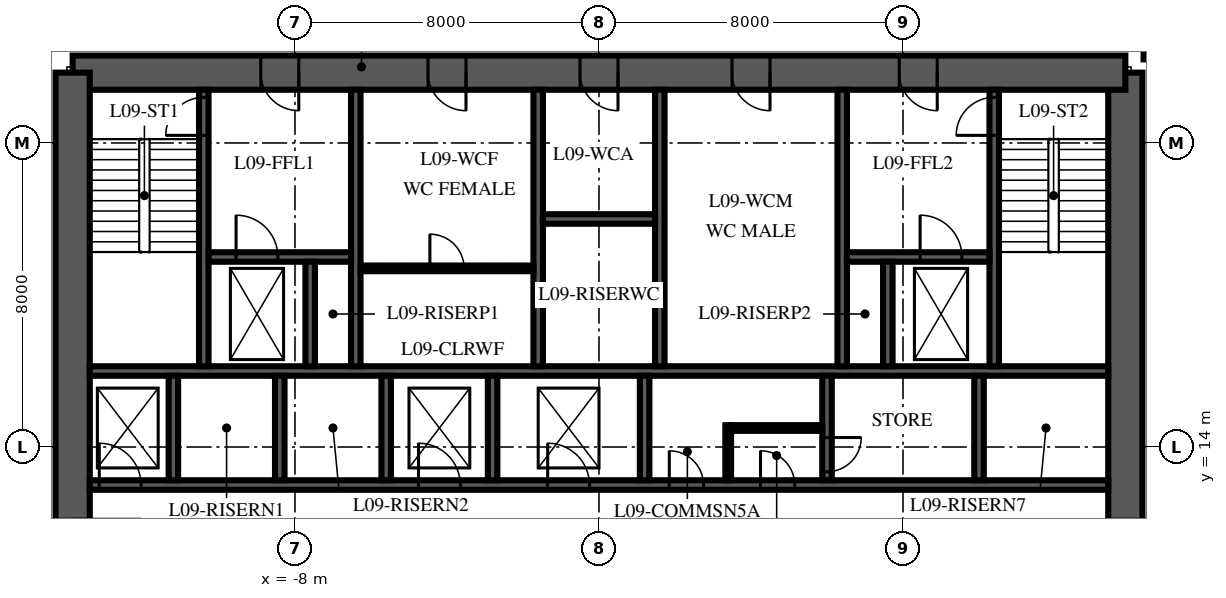
"""IFC4 building model, lengths in metres.
Left out: names, types, materials, properties, quantities, classifications, styles, units other than length and angle.
Written with IfcOpenShell. Run it as: python <this file> out.ifc"""

import sys

from ifc_helpers import new_model, si_unit, direction, frame, frame_2d, origin, place, context, subcontext, project, spatial, polyline, rectangle, outline, extrude, element, fill, save


model = new_model("IFC4")
c1 = context("Model", 3, precision=1e-05, world=origin(), true_north=direction((0.0, 1.0)))
c2 = subcontext(c1, "Body", "Model", "MODEL_VIEW")
j1 = project(units=[si_unit("LENGTHUNIT", "METRE"), si_unit("PLANEANGLEUNIT", "RADIAN")], contexts=[c1])
p1 = place(None, origin())
s1 = spatial("IfcSite", under=j1, at=p1, CompositionType="ELEMENT")
p2 = place(p1, origin())
s2 = spatial("IfcBuilding", under=s1, at=p2, CompositionType="ELEMENT")
p3 = place(p2, frame((0.0, 0.0, 48.0)))
s3 = spatial("IfcBuildingStorey", under=s2, at=p3, CompositionType="ELEMENT", Elevation=48.0)
p4 = place(p3, frame((13.85, 6.15, 0.0), z_axis=(0.0, 0.0, 1.0), x_axis=(0.0, 1.0, 0.0)))
e1 = element("IfcWall", 1, at=p4, inside=s3, PredefinedType="SHEAR", context=c2, shape_type="SweptSolid", body=[
    extrude(outline(polyline([(0.0, -0.45), (17.7, -0.45), (17.7, 0.0), (17.25, 0.0), (17.25, 0.45), (0.45, 0.45), (0.45, 0.0), (0.0, 0.0), (0.0, -0.45)])), origin(), (0.0, 0.0, 1.0), 4.0),
])
p5 = place(p4, frame((4.15, 0.0, 0.0)))
e2 = element("IfcOpeningElement", 2, at=p5, cuts=e1, PredefinedType="OPENING", context=c2, shape_type="SweptSolid", body=[
    extrude(rectangle(XDim=1.8, YDim=2.4, at=frame_2d((0.9, 1.2))), frame((0.0, 0.465, 0.0), z_axis=(0.0, -1.0, 0.0), x_axis=(1.0, 0.0, 0.0)), (0.0, 0.0, 1.0), 0.93),
])
p6 = place(p3, frame((13.85, 23.85, 0.0), z_axis=(0.0, 0.0, 1.0), x_axis=(-1.0, 0.0, 0.0)))
e3 = element("IfcWall", 3, at=p6, inside=s3, PredefinedType="SHEAR", context=c2, shape_type="SweptSolid", body=[
    extrude(rectangle(XDim=27.7, YDim=0.9, at=frame_2d((13.85, 0.0))), origin(), (0.0, 0.0, 1.0), 4.0),
])
p7 = place(p6, frame((21.75, 0.0, 0.0)))
e4 = element("IfcOpeningElement", 4, at=p7, cuts=e3, PredefinedType="OPENING", context=c2, shape_type="SweptSolid", body=[
    extrude(rectangle(XDim=1.0, YDim=2.1, at=frame_2d((0.5, 1.05))), frame((0.0, 0.465, 0.0), z_axis=(0.0, -1.0, 0.0), x_axis=(1.0, 0.0, 0.0)), (0.0, 0.0, 1.0), 0.93),
])
p8 = place(p6, frame((4.95, 0.0, 0.0)))
e5 = element("IfcOpeningElement", 5, at=p8, cuts=e3, PredefinedType="OPENING", context=c2, shape_type="SweptSolid", body=[
    extrude(rectangle(XDim=1.0, YDim=2.1, at=frame_2d((0.5, 1.05))), frame((0.0, 0.465, 0.0), z_axis=(0.0, -1.0, 0.0), x_axis=(1.0, 0.0, 0.0)), (0.0, 0.0, 1.0), 0.93),
])
p9 = place(p6, frame((17.35, 0.0, 0.0)))
e6 = element("IfcOpeningElement", 6, at=p9, cuts=e3, PredefinedType="OPENING", context=c2, shape_type="SweptSolid", body=[
    extrude(rectangle(XDim=1.0, YDim=2.1, at=frame_2d((0.5, 1.05))), frame((0.0, 0.465, 0.0), z_axis=(0.0, -1.0, 0.0), x_axis=(1.0, 0.0, 0.0)), (0.0, 0.0, 1.0), 0.93),
])
p10 = place(p6, frame((13.35, 0.0, 0.0)))
e7 = element("IfcOpeningElement", 7, at=p10, cuts=e3, PredefinedType="OPENING", context=c2, shape_type="SweptSolid", body=[
    extrude(rectangle(XDim=1.0, YDim=2.1, at=frame_2d((0.5, 1.05))), frame((0.0, 0.465, 0.0), z_axis=(0.0, -1.0, 0.0), x_axis=(1.0, 0.0, 0.0)), (0.0, 0.0, 1.0), 0.93),
])
p11 = place(p6, frame((9.35, 0.0, 0.0)))
e8 = element("IfcOpeningElement", 8, at=p11, cuts=e3, PredefinedType="OPENING", context=c2, shape_type="SweptSolid", body=[
    extrude(rectangle(XDim=1.0, YDim=2.1, at=frame_2d((0.5, 1.05))), frame((0.0, 0.465, 0.0), z_axis=(0.0, -1.0, 0.0), x_axis=(1.0, 0.0, 0.0)), (0.0, 0.0, 1.0), 0.93),
])
p12 = place(p3, frame((-13.85, 23.85, 0.0), z_axis=(0.0, 0.0, 1.0), x_axis=(0.0, -1.0, 0.0)))
e9 = element("IfcWall", 9, at=p12, inside=s3, PredefinedType="SHEAR", context=c2, shape_type="SweptSolid", body=[
    extrude(outline(polyline([(0.0, -0.45), (17.7, -0.45), (17.7, 0.0), (17.25, 0.0), (17.25, 0.45), (0.45, 0.45), (0.45, 0.0), (0.0, 0.0), (0.0, -0.45)])), origin(), (0.0, 0.0, 1.0), 4.0),
])
p13 = place(p12, frame((11.75, 0.0, 0.0)))
e10 = element("IfcOpeningElement", 10, at=p13, cuts=e9, PredefinedType="OPENING", context=c2, shape_type="SweptSolid", body=[
    extrude(rectangle(XDim=1.8, YDim=2.4, at=frame_2d((0.9, 1.2))), frame((0.0, 0.465, 0.0), z_axis=(0.0, -1.0, 0.0), x_axis=(1.0, 0.0, 0.0)), (0.0, 0.0, 1.0), 0.93),
])
p14 = place(p3, frame((-13.4, 13.0, 0.0), z_axis=(0.0, 0.0, 1.0), x_axis=(1.0, 0.0, 0.0)))
e11 = element("IfcWall", 11, at=p14, inside=s3, PredefinedType="SHEAR", context=c2, shape_type="SweptSolid", body=[
    extrude(rectangle(XDim=26.8, YDim=0.25, at=frame_2d((13.4, 0.0))), origin(), (0.0, 0.0, 1.0), 4.0),
])
p15 = place(p14, frame((0.25, 0.0, 0.0)))
e12 = element("IfcOpeningElement", 12, at=p15, cuts=e11, PredefinedType="OPENING", context=c2, shape_type="SweptSolid", body=[
    extrude(rectangle(XDim=1.1, YDim=2.1, at=frame_2d((0.55, 1.05))), frame((0.0, 0.14, 0.0), z_axis=(0.0, -1.0, 0.0), x_axis=(1.0, 0.0, 0.0)), (0.0, 0.0, 1.0), 0.28),
])
p16 = place(p14, frame((8.65, 0.0, 0.0)))
e13 = element("IfcOpeningElement", 13, at=p16, cuts=e11, PredefinedType="OPENING", context=c2, shape_type="SweptSolid", body=[
    extrude(rectangle(XDim=1.1, YDim=2.1, at=frame_2d((0.55, 1.05))), frame((0.0, 0.14, 0.0), z_axis=(0.0, -1.0, 0.0), x_axis=(1.0, 0.0, 0.0)), (0.0, 0.0, 1.0), 0.28),
])
p17 = place(p14, frame((12.05, 0.0, 0.0)))
e14 = element("IfcOpeningElement", 14, at=p17, cuts=e11, PredefinedType="OPENING", context=c2, shape_type="SweptSolid", body=[
    extrude(rectangle(XDim=1.1, YDim=2.1, at=frame_2d((0.55, 1.05))), frame((0.0, 0.14, 0.0), z_axis=(0.0, -1.0, 0.0), x_axis=(1.0, 0.0, 0.0)), (0.0, 0.0, 1.0), 0.28),
])
p18 = place(p14, frame((15.25, 0.0, 0.0)))
e15 = element("IfcOpeningElement", 15, at=p18, cuts=e11, PredefinedType="OPENING", context=c2, shape_type="SweptSolid", body=[
    extrude(rectangle(XDim=0.9, YDim=2.1, at=frame_2d((0.45, 1.05))), frame((0.0, 0.14, 0.0), z_axis=(0.0, -1.0, 0.0), x_axis=(1.0, 0.0, 0.0)), (0.0, 0.0, 1.0), 0.28),
])
p19 = place(p14, frame((17.65, 0.0, 0.0)))
e16 = element("IfcOpeningElement", 16, at=p19, cuts=e11, PredefinedType="OPENING", context=c2, shape_type="SweptSolid", body=[
    extrude(rectangle(XDim=0.9, YDim=2.1, at=frame_2d((0.45, 1.05))), frame((0.0, 0.14, 0.0), z_axis=(0.0, -1.0, 0.0), x_axis=(1.0, 0.0, 0.0)), (0.0, 0.0, 1.0), 0.28),
])
p20 = place(p3, frame((-13.4, 16.0, 0.0), z_axis=(0.0, 0.0, 1.0), x_axis=(1.0, 0.0, 0.0)))
e17 = element("IfcWall", 17, at=p20, inside=s3, PredefinedType="SHEAR", context=c2, shape_type="SweptSolid", body=[
    extrude(rectangle(XDim=26.8, YDim=0.25, at=frame_2d((13.4, 0.0))), origin(), (0.0, 0.0, 1.0), 4.0),
])
for number, where, z_axis, x_axis in (
    (18, (-11.2, 13.125, 0.0), (0.0, 0.0, 1.0), (0.0, 1.0, 0.0)),
    (19, (-8.4, 13.125, 0.0), (0.0, 0.0, 1.0), (0.0, 1.0, 0.0)),
    (20, (-5.6, 13.125, 0.0), (0.0, 0.0, 1.0), (0.0, 1.0, 0.0)),
    (21, (-2.8, 13.125, 0.0), (0.0, 0.0, 1.0), (0.0, 1.0, 0.0)),
    (22, (1.2, 13.125, 0.0), (0.0, 0.0, 1.0), (0.0, 1.0, 0.0)),
):
    element("IfcWall", number, at=place(p3, frame(where, z_axis=z_axis, x_axis=x_axis)), inside=s3, PredefinedType="SHEAR", context=c2, shape_type="SweptSolid", body=[
        extrude(rectangle(XDim=2.75, YDim=0.25, at=frame_2d((1.375, 0.0))), origin(), (0.0, 0.0, 1.0), 4.0),
    ])
p21 = place(p3, frame((6.0, 13.125, 0.0), z_axis=(0.0, 0.0, 1.0), x_axis=(0.0, 1.0, 0.0)))
e23 = element("IfcWall", 23, at=p21, inside=s3, PredefinedType="SHEAR", context=c2, shape_type="SweptSolid", body=[
    extrude(rectangle(XDim=2.75, YDim=0.25, at=frame_2d((1.375, 0.0))), origin(), (0.0, 0.0, 1.0), 4.0),
])
p22 = place(p21, frame((0.225, 0.0, 0.0)))
e24 = element("IfcOpeningElement", 24, at=p22, cuts=e23, PredefinedType="OPENING", context=c2, shape_type="SweptSolid", body=[
    extrude(rectangle(XDim=0.9, YDim=2.1, at=frame_2d((0.45, 1.05))), frame((0.0, 0.14, 0.0), z_axis=(0.0, -1.0, 0.0), x_axis=(1.0, 0.0, 0.0)), (0.0, 0.0, 1.0), 0.28),
])
p23 = place(p3, frame((10.0, 13.125, 0.0), z_axis=(0.0, 0.0, 1.0), x_axis=(0.0, 1.0, 0.0)))
e25 = element("IfcWall", 25, at=p23, inside=s3, PredefinedType="SHEAR", context=c2, shape_type="SweptSolid", body=[
    extrude(rectangle(XDim=2.75, YDim=0.25, at=frame_2d((1.375, 0.0))), origin(), (0.0, 0.0, 1.0), 4.0),
])
p24 = place(p3, frame((-10.4, 16.125, 0.0), z_axis=(0.0, 0.0, 1.0), x_axis=(0.0, 1.0, 0.0)))
e26 = element("IfcWall", 26, at=p24, inside=s3, PredefinedType="SHEAR", context=c2, shape_type="SweptSolid", body=[
    extrude(rectangle(XDim=7.275, YDim=0.25, at=frame_2d((3.637, 0.0))), origin(), (0.0, 0.0, 1.0), 4.0),
])
p25 = place(p24, frame((6.075, 0.0, 0.0)))
e27 = element("IfcOpeningElement", 27, at=p25, cuts=e26, PredefinedType="OPENING", context=c2, shape_type="SweptSolid", body=[
    extrude(rectangle(XDim=1.0, YDim=2.1, at=frame_2d((0.5, 1.05))), frame((0.0, 0.14, 0.0), z_axis=(0.0, -1.0, 0.0), x_axis=(1.0, 0.0, 0.0)), (0.0, 0.0, 1.0), 0.28),
])
for number, where, z_axis, x_axis in (
    (28, (-6.4, 16.125, 0.0), (0.0, 0.0, 1.0), (0.0, 1.0, 0.0)),
    (29, (-1.6, 16.125, 0.0), (0.0, 0.0, 1.0), (0.0, 1.0, 0.0)),
    (30, (1.6, 16.125, 0.0), (0.0, 0.0, 1.0), (0.0, 1.0, 0.0)),
    (31, (6.4, 16.125, 0.0), (0.0, 0.0, 1.0), (0.0, 1.0, 0.0)),
):
    element("IfcWall", number, at=place(p3, frame(where, z_axis=z_axis, x_axis=x_axis)), inside=s3, PredefinedType="SHEAR", context=c2, shape_type="SweptSolid", body=[
        extrude(rectangle(XDim=7.275, YDim=0.25, at=frame_2d((3.637, 0.0))), origin(), (0.0, 0.0, 1.0), 4.0),
    ])
p26 = place(p3, frame((10.4, 16.125, 0.0), z_axis=(0.0, 0.0, 1.0), x_axis=(0.0, 1.0, 0.0)))
e32 = element("IfcWall", 32, at=p26, inside=s3, PredefinedType="SHEAR", context=c2, shape_type="SweptSolid", body=[
    extrude(rectangle(XDim=7.275, YDim=0.25, at=frame_2d((3.637, 0.0))), origin(), (0.0, 0.0, 1.0), 4.0),
])
p27 = place(p26, frame((6.075, 0.0, 0.0)))
e33 = element("IfcOpeningElement", 33, at=p27, cuts=e32, PredefinedType="OPENING", context=c2, shape_type="SweptSolid", body=[
    extrude(rectangle(XDim=1.0, YDim=2.1, at=frame_2d((0.5, 1.05))), frame((0.0, 0.14, 0.0), z_axis=(0.0, -1.0, 0.0), x_axis=(1.0, 0.0, 0.0)), (0.0, 0.0, 1.0), 0.28),
])
p28 = place(p3, frame((-10.275, 19.0, 0.0), z_axis=(0.0, 0.0, 1.0), x_axis=(1.0, 0.0, 0.0)))
e34 = element("IfcWall", 34, at=p28, inside=s3, PredefinedType="SHEAR", context=c2, shape_type="SweptSolid", body=[
    extrude(rectangle(XDim=3.75, YDim=0.25, at=frame_2d((1.875, 0.0))), origin(), (0.0, 0.0, 1.0), 4.0),
])
p29 = place(p28, frame((0.725, 0.0, 0.0)))
e35 = element("IfcOpeningElement", 35, at=p29, cuts=e34, PredefinedType="OPENING", context=c2, shape_type="SweptSolid", body=[
    extrude(rectangle(XDim=1.1, YDim=2.1, at=frame_2d((0.55, 1.05))), frame((0.0, 0.14, 0.0), z_axis=(0.0, -1.0, 0.0), x_axis=(1.0, 0.0, 0.0)), (0.0, 0.0, 1.0), 0.28),
])
p30 = place(p3, frame((6.525, 19.0, 0.0), z_axis=(0.0, 0.0, 1.0), x_axis=(1.0, 0.0, 0.0)))
e36 = element("IfcWall", 36, at=p30, inside=s3, PredefinedType="SHEAR", context=c2, shape_type="SweptSolid", body=[
    extrude(rectangle(XDim=3.75, YDim=0.25, at=frame_2d((1.875, 0.0))), origin(), (0.0, 0.0, 1.0), 4.0),
])
p31 = place(p30, frame((1.925, 0.0, 0.0)))
e37 = element("IfcOpeningElement", 37, at=p31, cuts=e36, PredefinedType="OPENING", context=c2, shape_type="SweptSolid", body=[
    extrude(rectangle(XDim=1.1, YDim=2.1, at=frame_2d((0.55, 1.05))), frame((0.0, 0.14, 0.0), z_axis=(0.0, -1.0, 0.0), x_axis=(1.0, 0.0, 0.0)), (0.0, 0.0, 1.0), 0.28),
])
for number, where, z_axis, x_axis in (
    (38, (-7.6, 16.125, 0.0), (0.0, 0.0, 1.0), (0.0, 1.0, 0.0)),
    (39, (7.6, 16.125, 0.0), (0.0, 0.0, 1.0), (0.0, 1.0, 0.0)),
):
    element("IfcWall", number, at=place(p3, frame(where, z_axis=z_axis, x_axis=x_axis)), inside=s3, PredefinedType="SHEAR", context=c2, shape_type="SweptSolid", body=[
        extrude(rectangle(XDim=2.75, YDim=0.25, at=frame_2d((1.375, 0.0))), origin(), (0.0, 0.0, 1.0), 4.0),
    ])
p32 = place(p3, frame((-1.475, 20.0, 0.0), z_axis=(0.0, 0.0, 1.0), x_axis=(1.0, 0.0, 0.0)))
e40 = element("IfcWall", 40, at=p32, inside=s3, PredefinedType="SHEAR", context=c2, shape_type="SweptSolid", body=[
    extrude(rectangle(XDim=2.95, YDim=0.25, at=frame_2d((1.475, 0.0))), origin(), (0.0, 0.0, 1.0), 4.0),
])
p33 = place(p3, frame((-6.275, 18.7, 0.0), z_axis=(0.0, 0.0, 1.0), x_axis=(1.0, 0.0, 0.0)))
e41 = element("IfcWall", 41, at=p33, inside=s3, PredefinedType="PARTITIONING", context=c2, shape_type="SweptSolid", body=[
    extrude(rectangle(XDim=4.55, YDim=0.15, at=frame_2d((2.275, 0.0))), origin(), (0.0, 0.0, 1.0), 3.85),
])
p34 = place(p33, frame((1.825, 0.0, 0.0)))
e42 = element("IfcOpeningElement", 42, at=p34, cuts=e41, PredefinedType="OPENING", context=c2, shape_type="SweptSolid", body=[
    extrude(rectangle(XDim=0.9, YDim=2.1, at=frame_2d((0.45, 1.05))), frame((0.0, 0.09, 0.0), z_axis=(0.0, -1.0, 0.0), x_axis=(1.0, 0.0, 0.0)), (0.0, 0.0, 1.0), 0.18),
])
p35 = place(p3, frame((3.4, 13.125, 0.0), z_axis=(0.0, 0.0, 1.0), x_axis=(0.0, 1.0, 0.0)))
e43 = element("IfcWall", 43, at=p35, inside=s3, PredefinedType="PARTITIONING", context=c2, shape_type="SweptSolid", body=[
    extrude(rectangle(XDim=1.45, YDim=0.15, at=frame_2d((0.725, 0.0))), origin(), (0.0, 0.0, 1.0), 3.85),
])
p36 = place(p3, frame((3.475, 14.5, 0.0), z_axis=(0.0, 0.0, 1.0), x_axis=(1.0, 0.0, 0.0)))
e44 = element("IfcWall", 44, at=p36, inside=s3, PredefinedType="PARTITIONING", context=c2, shape_type="SweptSolid", body=[
    extrude(rectangle(XDim=2.4, YDim=0.15, at=frame_2d((1.2, 0.0))), origin(), (0.0, 0.0, 1.0), 3.85),
])
p37 = place(p3, frame((14.33, 24.3, 0.0), z_axis=(0.0, 0.0, 1.0), x_axis=(1.0, 0.0, 0.0)))
e45 = element("IfcWall", 45, at=p37, inside=s3, PredefinedType="PARTITIONING", context=c2, shape_type="SweptSolid", body=[
    extrude(rectangle(XDim=1.82, YDim=0.2, at=frame_2d((0.91, 0.0))), origin(), (0.0, 0.0, 1.0), 3.4),
])
p38 = place(p7, origin())
e46 = element("IfcDoor", 46, at=p38, inside=s3, OperationType="SINGLE_SWING_RIGHT", PredefinedType="DOOR", context=c2, shape_type="SweptSolid", body=[
    extrude(rectangle(XDim=1.0, YDim=2.1, at=frame_2d((0.5, 1.05))), frame((0.0, 0.45, 0.0), z_axis=(0.0, -1.0, 0.0), x_axis=(1.0, 0.0, 0.0)), (0.0, 0.0, 1.0), 0.899),
])
fill(e4, e46)
p39 = place(p8, origin())
e47 = element("IfcDoor", 47, at=p39, inside=s3, OperationType="SINGLE_SWING_RIGHT", PredefinedType="DOOR", context=c2, shape_type="SweptSolid", body=[
    extrude(rectangle(XDim=1.0, YDim=2.1, at=frame_2d((0.5, 1.05))), frame((0.0, 0.45, 0.0), z_axis=(0.0, -1.0, 0.0), x_axis=(1.0, 0.0, 0.0)), (0.0, 0.0, 1.0), 0.899),
])
fill(e5, e47)
p40 = place(p9, origin())
e48 = element("IfcDoor", 48, at=p40, inside=s3, OperationType="SINGLE_SWING_LEFT", PredefinedType="DOOR", context=c2, shape_type="SweptSolid", body=[
    extrude(rectangle(XDim=1.0, YDim=2.1, at=frame_2d((0.5, 1.05))), frame((0.0, 0.45, 0.0), z_axis=(0.0, -1.0, 0.0), x_axis=(1.0, 0.0, 0.0)), (0.0, 0.0, 1.0), 0.899),
])
fill(e6, e48)
p41 = place(p10, origin())
e49 = element("IfcDoor", 49, at=p41, inside=s3, OperationType="SINGLE_SWING_LEFT", PredefinedType="DOOR", context=c2, shape_type="SweptSolid", body=[
    extrude(rectangle(XDim=1.0, YDim=2.1, at=frame_2d((0.5, 1.05))), frame((0.0, 0.45, 0.0), z_axis=(0.0, -1.0, 0.0), x_axis=(1.0, 0.0, 0.0)), (0.0, 0.0, 1.0), 0.899),
])
fill(e7, e49)
p42 = place(p11, origin())
e50 = element("IfcDoor", 50, at=p42, inside=s3, OperationType="SINGLE_SWING_LEFT", PredefinedType="DOOR", context=c2, shape_type="SweptSolid", body=[
    extrude(rectangle(XDim=1.0, YDim=2.1, at=frame_2d((0.5, 1.05))), frame((0.0, 0.45, 0.0), z_axis=(0.0, -1.0, 0.0), x_axis=(1.0, 0.0, 0.0)), (0.0, 0.0, 1.0), 0.899),
])
fill(e8, e50)
p43 = place(p25, origin())
e51 = element("IfcDoor", 51, at=p43, inside=s3, OperationType="SINGLE_SWING_LEFT", PredefinedType="DOOR", context=c2, shape_type="SweptSolid", body=[
    extrude(rectangle(XDim=1.0, YDim=2.1, at=frame_2d((0.5, 1.05))), frame((0.0, 0.125, 0.0), z_axis=(0.0, -1.0, 0.0), x_axis=(1.0, 0.0, 0.0)), (0.0, 0.0, 1.0), 0.25),
])
fill(e27, e51)
p44 = place(p27, origin())
e52 = element("IfcDoor", 52, at=p44, inside=s3, OperationType="SINGLE_SWING_LEFT", PredefinedType="DOOR", context=c2, shape_type="SweptSolid", body=[
    extrude(rectangle(XDim=1.0, YDim=2.1, at=frame_2d((0.5, 1.05))), frame((0.0, 0.125, 0.0), z_axis=(0.0, -1.0, 0.0), x_axis=(1.0, 0.0, 0.0)), (0.0, 0.0, 1.0), 0.25),
])
fill(e33, e52)
p45 = place(p15, origin())
e53 = element("IfcDoor", 53, at=p45, inside=s3, OperationType="SLIDING_TO_LEFT", PredefinedType="DOOR", context=c2, shape_type="SweptSolid", body=[
    extrude(rectangle(XDim=1.1, YDim=2.1, at=frame_2d((0.55, 1.05))), frame((0.0, 0.125, 0.0), z_axis=(0.0, -1.0, 0.0), x_axis=(1.0, 0.0, 0.0)), (0.0, 0.0, 1.0), 0.25),
])
fill(e12, e53)
p46 = place(p16, origin())
e54 = element("IfcDoor", 54, at=p46, inside=s3, OperationType="SLIDING_TO_LEFT", PredefinedType="DOOR", context=c2, shape_type="SweptSolid", body=[
    extrude(rectangle(XDim=1.1, YDim=2.1, at=frame_2d((0.55, 1.05))), frame((0.0, 0.125, 0.0), z_axis=(0.0, -1.0, 0.0), x_axis=(1.0, 0.0, 0.0)), (0.0, 0.0, 1.0), 0.25),
])
fill(e13, e54)
p47 = place(p17, origin())
e55 = element("IfcDoor", 55, at=p47, inside=s3, OperationType="SLIDING_TO_LEFT", PredefinedType="DOOR", context=c2, shape_type="SweptSolid", body=[
    extrude(rectangle(XDim=1.1, YDim=2.1, at=frame_2d((0.55, 1.05))), frame((0.0, 0.125, 0.0), z_axis=(0.0, -1.0, 0.0), x_axis=(1.0, 0.0, 0.0)), (0.0, 0.0, 1.0), 0.25),
])
fill(e14, e55)
p48 = place(p31, origin())
e56 = element("IfcDoor", 56, at=p48, inside=s3, OperationType="SLIDING_TO_RIGHT", PredefinedType="DOOR", context=c2, shape_type="SweptSolid", body=[
    extrude(rectangle(XDim=1.1, YDim=2.1, at=frame_2d((0.55, 1.05))), frame((0.0, 0.125, 0.0), z_axis=(0.0, -1.0, 0.0), x_axis=(1.0, 0.0, 0.0)), (0.0, 0.0, 1.0), 0.25),
])
fill(e37, e56)
p49 = place(p29, origin())
e57 = element("IfcDoor", 57, at=p49, inside=s3, OperationType="SLIDING_TO_RIGHT", PredefinedType="DOOR", context=c2, shape_type="SweptSolid", body=[
    extrude(rectangle(XDim=1.1, YDim=2.1, at=frame_2d((0.55, 1.05))), frame((0.0, 0.125, 0.0), z_axis=(0.0, -1.0, 0.0), x_axis=(1.0, 0.0, 0.0)), (0.0, 0.0, 1.0), 0.25),
])
fill(e35, e57)
p50 = place(p18, origin())
e58 = element("IfcDoor", 58, at=p50, inside=s3, OperationType="SINGLE_SWING_LEFT", PredefinedType="DOOR", context=c2, shape_type="SweptSolid", body=[
    extrude(rectangle(XDim=0.9, YDim=2.1, at=frame_2d((0.45, 1.05))), frame((0.0, 0.125, 0.0), z_axis=(0.0, -1.0, 0.0), x_axis=(1.0, 0.0, 0.0)), (0.0, 0.0, 1.0), 0.25),
])
fill(e15, e58)
p51 = place(p19, origin())
e59 = element("IfcDoor", 59, at=p51, inside=s3, OperationType="SINGLE_SWING_LEFT", PredefinedType="DOOR", context=c2, shape_type="SweptSolid", body=[
    extrude(rectangle(XDim=0.9, YDim=2.1, at=frame_2d((0.45, 1.05))), frame((0.0, 0.125, 0.0), z_axis=(0.0, -1.0, 0.0), x_axis=(1.0, 0.0, 0.0)), (0.0, 0.0, 1.0), 0.25),
])
fill(e16, e59)
p52 = place(p22, frame((0.9, 0.0, 0.0), z_axis=(0.0, 0.0, 1.0), x_axis=(-1.0, 0.0, 0.0)))
e60 = element("IfcDoor", 60, at=p52, inside=s3, OperationType="SINGLE_SWING_LEFT", PredefinedType="DOOR", context=c2, shape_type="SweptSolid", body=[
    extrude(rectangle(XDim=0.9, YDim=2.1, at=frame_2d((0.45, 1.05))), frame((0.0, 0.125, 0.0), z_axis=(0.0, -1.0, 0.0), x_axis=(1.0, 0.0, 0.0)), (0.0, 0.0, 1.0), 0.25),
])
fill(e24, e60)
p53 = place(p34, origin())
e61 = element("IfcDoor", 61, at=p53, inside=s3, OperationType="SINGLE_SWING_LEFT", PredefinedType="DOOR", context=c2, shape_type="SweptSolid", body=[
    extrude(rectangle(XDim=0.9, YDim=2.1, at=frame_2d((0.45, 1.05))), frame((0.0, 0.075, 0.0), z_axis=(0.0, -1.0, 0.0), x_axis=(1.0, 0.0, 0.0)), (0.0, 0.0, 1.0), 0.149),
])
fill(e42, e61)
save(model, sys.argv[1])
